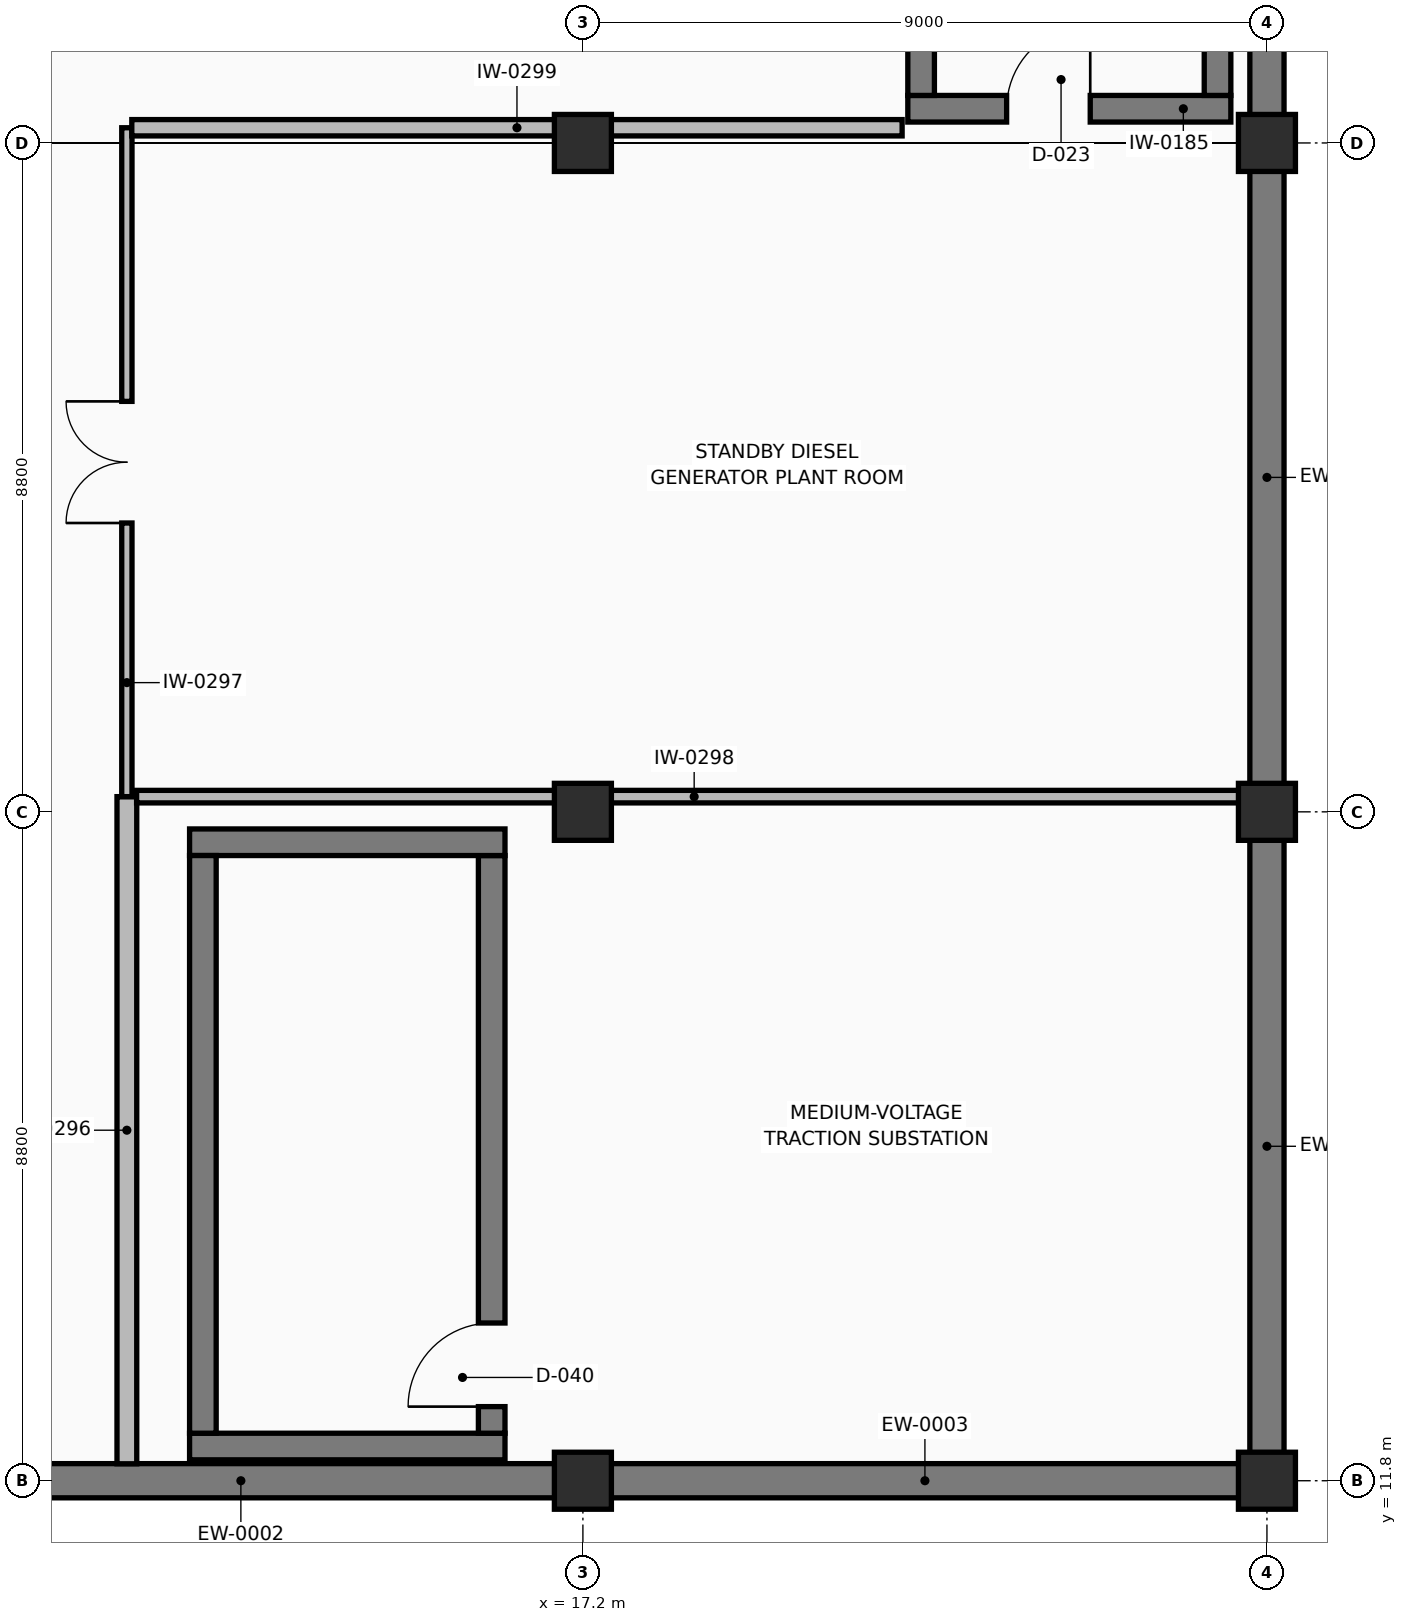
"""IFC4 building model, lengths in metres.
Left out: names, types, materials, properties, quantities, classifications, styles, units other than length and angle.
Written with IfcOpenShell. Run it as: python <this file> out.ifc"""

import sys

from ifc_helpers import new_model, si_unit, direction, frame, frame_2d, origin, origin_2d, place, context, subcontext, project, spatial, rectangle, extrude, element, fill, save


model = new_model("IFC4")
c1 = context("Model", 3, precision=1e-05, world=origin(), true_north=direction((0.0, 1.0)))
c2 = subcontext(c1, "Body", "Model", "MODEL_VIEW")
j1 = project(units=[si_unit("LENGTHUNIT", "METRE"), si_unit("PLANEANGLEUNIT", "RADIAN")], contexts=[c1])
p1 = place(None, origin())
s1 = spatial("IfcSite", under=j1, at=p1, CompositionType="ELEMENT")
p2 = place(p1, origin())
s2 = spatial("IfcBuilding", under=s1, at=p2, CompositionType="ELEMENT")
p3 = place(p2, frame((0.0, 0.0, -4.5)))
s3 = spatial("IfcBuildingStorey", under=s2, at=p3, CompositionType="ELEMENT", Elevation=-4.5)
for number, where, z_axis, x_axis in (
    (1, (17.2, 11.8, 0.0), (0.0, 0.0, 1.0), (1.0, 0.0, 0.0)),
    (2, (17.2, 20.6, 0.0), (0.0, 0.0, 1.0), (1.0, 0.0, 0.0)),
    (3, (17.2, 29.4, 0.0), (0.0, 0.0, 1.0), (1.0, 0.0, 0.0)),
    (4, (26.2, 11.8, 0.0), (0.0, 0.0, 1.0), (1.0, 0.0, 0.0)),
    (5, (26.2, 20.6, 0.0), (0.0, 0.0, 1.0), (1.0, 0.0, 0.0)),
    (6, (26.2, 29.4, 0.0), (0.0, 0.0, 1.0), (1.0, 0.0, 0.0)),
):
    element("IfcColumn", number, at=place(p3, frame(where, z_axis=z_axis, x_axis=x_axis)), inside=s3, PredefinedType="COLUMN", context=c2, shape_type="SweptSolid", body=[
        extrude(rectangle(XDim=0.75, YDim=0.75, at=origin_2d()), origin(), (0.0, 0.0, 1.0), 4.5),
    ])
for number, where, z_axis, x_axis in (
    (7, (8.57, 11.8, 0.0), (0.0, 0.0, 1.0), (1.0, 0.0, 0.0)),
    (8, (17.57, 11.8, 0.0), (0.0, 0.0, 1.0), (1.0, 0.0, 0.0)),
):
    element("IfcWall", number, at=place(p3, frame(where, z_axis=z_axis, x_axis=x_axis)), inside=s3, PredefinedType="USERDEFINED", context=c2, shape_type="SweptSolid", body=[
        extrude(rectangle(XDim=8.26, YDim=0.45, at=frame_2d((4.13, 0.0))), origin(), (0.0, 0.0, 1.0), 3.285),
    ])
for number, where, z_axis, x_axis in (
    (9, (26.2, 12.17, 0.0), (0.0, 0.0, 1.0), (0.0, 1.0, 0.0)),
    (10, (26.2, 20.97, 0.0), (0.0, 0.0, 1.0), (0.0, 1.0, 0.0)),
    (11, (26.2, 29.77, 0.0), (0.0, 0.0, 1.0), (0.0, 1.0, 0.0)),
):
    element("IfcWall", number, at=place(p3, frame(where, z_axis=z_axis, x_axis=x_axis)), inside=s3, PredefinedType="USERDEFINED", context=c2, shape_type="SweptSolid", body=[
        extrude(rectangle(XDim=8.06, YDim=0.45, at=frame_2d((4.03, 0.0))), origin(), (0.0, 0.0, 1.0), 3.285),
    ])
p4 = place(p3, frame((21.475, 29.85, 0.0), z_axis=(0.0, 0.0, 1.0), x_axis=(1.0, 0.0, 0.0)))
e12 = element("IfcWall", 12, at=p4, inside=s3, PredefinedType="SHEAR", context=c2, shape_type="SweptSolid", body=[
    extrude(rectangle(XDim=4.25, YDim=0.35, at=frame_2d((2.125, 0.0))), origin(), (0.0, 0.0, 1.0), 4.19),
])
p5 = place(p4, frame((1.3, 0.0, 0.0)))
e13 = element("IfcOpeningElement", 13, at=p5, cuts=e12, PredefinedType="OPENING", context=c2, shape_type="SweptSolid", body=[
    extrude(rectangle(XDim=1.1, YDim=2.2, at=frame_2d((0.55, 1.1))), frame((0.0, 0.185, 0.0), z_axis=(0.0, -1.0, 0.0), x_axis=(1.0, 0.0, 0.0)), (0.0, 0.0, 1.0), 0.37),
])
for number, where, z_axis, x_axis in (
    (14, (25.55, 30.025, 0.0), (0.0, 0.0, 1.0), (0.0, 1.0, 0.0)),
    (15, (21.65, 37.475, 0.0), (0.0, 0.0, 1.0), (0.0, -1.0, 0.0)),
):
    element("IfcWall", number, at=place(p3, frame(where, z_axis=z_axis, x_axis=x_axis)), inside=s3, PredefinedType="SHEAR", context=c2, shape_type="SweptSolid", body=[
        extrude(rectangle(XDim=7.45, YDim=0.35, at=frame_2d((3.725, 0.0))), origin(), (0.0, 0.0, 1.0), 4.19),
    ])
p6 = place(p3, frame((12.025, 12.25, 0.0), z_axis=(0.0, 0.0, 1.0), x_axis=(1.0, 0.0, 0.0)))
e16 = element("IfcWall", 16, at=p6, inside=s3, PredefinedType="SHEAR", context=c2, shape_type="SweptSolid", body=[
    extrude(rectangle(XDim=4.15, YDim=0.35, at=frame_2d((2.075, 0.0))), origin(), (0.0, 0.0, 1.0), 4.19),
])
p7 = place(p3, frame((16.0, 12.425, 0.0), z_axis=(0.0, 0.0, 1.0), x_axis=(0.0, 1.0, 0.0)))
e17 = element("IfcWall", 17, at=p7, inside=s3, PredefinedType="SHEAR", context=c2, shape_type="SweptSolid", body=[
    extrude(rectangle(XDim=7.6, YDim=0.35, at=frame_2d((3.8, 0.0))), origin(), (0.0, 0.0, 1.0), 4.19),
])
p8 = place(p7, frame((0.35, 0.0, 0.0)))
e18 = element("IfcOpeningElement", 18, at=p8, cuts=e17, PredefinedType="OPENING", context=c2, shape_type="SweptSolid", body=[
    extrude(rectangle(XDim=1.1, YDim=2.2, at=frame_2d((0.55, 1.1))), frame((0.0, 0.185, 0.0), z_axis=(0.0, -1.0, 0.0), x_axis=(1.0, 0.0, 0.0)), (0.0, 0.0, 1.0), 0.37),
])
p9 = place(p3, frame((16.175, 20.2, 0.0), z_axis=(0.0, 0.0, 1.0), x_axis=(-1.0, 0.0, 0.0)))
e19 = element("IfcWall", 19, at=p9, inside=s3, PredefinedType="SHEAR", context=c2, shape_type="SweptSolid", body=[
    extrude(rectangle(XDim=4.15, YDim=0.35, at=frame_2d((2.075, 0.0))), origin(), (0.0, 0.0, 1.0), 4.19),
])
p10 = place(p3, frame((12.2, 20.025, 0.0), z_axis=(0.0, 0.0, 1.0), x_axis=(0.0, -1.0, 0.0)))
e20 = element("IfcWall", 20, at=p10, inside=s3, PredefinedType="SHEAR", context=c2, shape_type="SweptSolid", body=[
    extrude(rectangle(XDim=7.6, YDim=0.35, at=frame_2d((3.8, 0.0))), origin(), (0.0, 0.0, 1.0), 4.19),
])
p11 = place(p3, frame((11.2, 12.023, 0.0), z_axis=(0.0, 0.0, 1.0), x_axis=(0.0, 1.0, 0.0)))
e21 = element("IfcWall", 21, at=p11, inside=s3, PredefinedType="PARTITIONING", context=c2, shape_type="SweptSolid", body=[
    extrude(rectangle(XDim=8.777, YDim=0.26, at=frame_2d((4.389, 0.0))), origin(), (0.0, 0.0, 1.0), 3.275),
])
p12 = place(p3, frame((11.2, 20.8, 0.0), z_axis=(0.0, 0.0, 1.0), x_axis=(0.0, 1.0, 0.0)))
e22 = element("IfcWall", 22, at=p12, inside=s3, PredefinedType="PARTITIONING", context=c2, shape_type="SweptSolid", body=[
    extrude(rectangle(XDim=8.8, YDim=0.135, at=frame_2d((4.4, 0.0))), origin(), (0.0, 0.0, 1.0), 3.275),
])
p13 = place(p12, frame((3.6, 0.0, 0.0)))
e23 = element("IfcOpeningElement", 23, at=p13, cuts=e22, PredefinedType="OPENING", context=c2, shape_type="SweptSolid", body=[
    extrude(rectangle(XDim=1.6, YDim=2.25, at=frame_2d((0.8, 1.125))), frame((0.0, 0.077, 0.0), z_axis=(0.0, -1.0, 0.0), x_axis=(1.0, 0.0, 0.0)), (0.0, 0.0, 1.0), 0.155),
])
p14 = place(p3, frame((11.328, 20.8, 0.0), z_axis=(0.0, 0.0, 1.0), x_axis=(1.0, 0.0, 0.0)))
e24 = element("IfcWall", 24, at=p14, inside=s3, PredefinedType="PARTITIONING", context=c2, shape_type="SweptSolid", body=[
    extrude(rectangle(XDim=14.672, YDim=0.165, at=frame_2d((7.336, 0.0))), origin(), (0.0, 0.0, 1.0), 3.275),
])
p15 = place(p3, frame((11.265, 29.6, 0.0), z_axis=(0.0, 0.0, 1.0), x_axis=(1.0, 0.0, 0.0)))
e25 = element("IfcWall", 25, at=p15, inside=s3, PredefinedType="PARTITIONING", context=c2, shape_type="SweptSolid", body=[
    extrude(rectangle(XDim=10.135, YDim=0.215, at=frame_2d((5.067, 0.0))), origin(), (0.0, 0.0, 1.0), 3.275),
])
p16 = place(p5, origin())
e26 = element("IfcDoor", 26, at=p16, inside=s3, OperationType="SINGLE_SWING_RIGHT", PredefinedType="DOOR", context=c2, shape_type="SweptSolid", body=[
    extrude(rectangle(XDim=1.1, YDim=2.2, at=frame_2d((0.55, 1.1))), frame((0.0, 0.025, 0.0), z_axis=(0.0, -1.0, 0.0), x_axis=(1.0, 0.0, 0.0)), (0.0, 0.0, 1.0), 0.05),
])
fill(e13, e26)
p17 = place(p8, origin())
e27 = element("IfcDoor", 27, at=p17, inside=s3, OperationType="SINGLE_SWING_LEFT", PredefinedType="DOOR", context=c2, shape_type="SweptSolid", body=[
    extrude(rectangle(XDim=1.1, YDim=2.2, at=frame_2d((0.55, 1.1))), frame((0.0, 0.025, 0.0), z_axis=(0.0, -1.0, 0.0), x_axis=(1.0, 0.0, 0.0)), (0.0, 0.0, 1.0), 0.05),
])
fill(e18, e27)
p18 = place(p13, origin())
e28 = element("IfcDoor", 28, at=p18, inside=s3, OperationType="DOUBLE_SWING_RIGHT", PredefinedType="DOOR", context=c2, shape_type="SweptSolid", body=[
    extrude(rectangle(XDim=1.6, YDim=2.25, at=frame_2d((0.8, 1.125))), frame((0.0, 0.025, 0.0), z_axis=(0.0, -1.0, 0.0), x_axis=(1.0, 0.0, 0.0)), (0.0, 0.0, 1.0), 0.05),
])
fill(e23, e28)
save(model, sys.argv[1])
